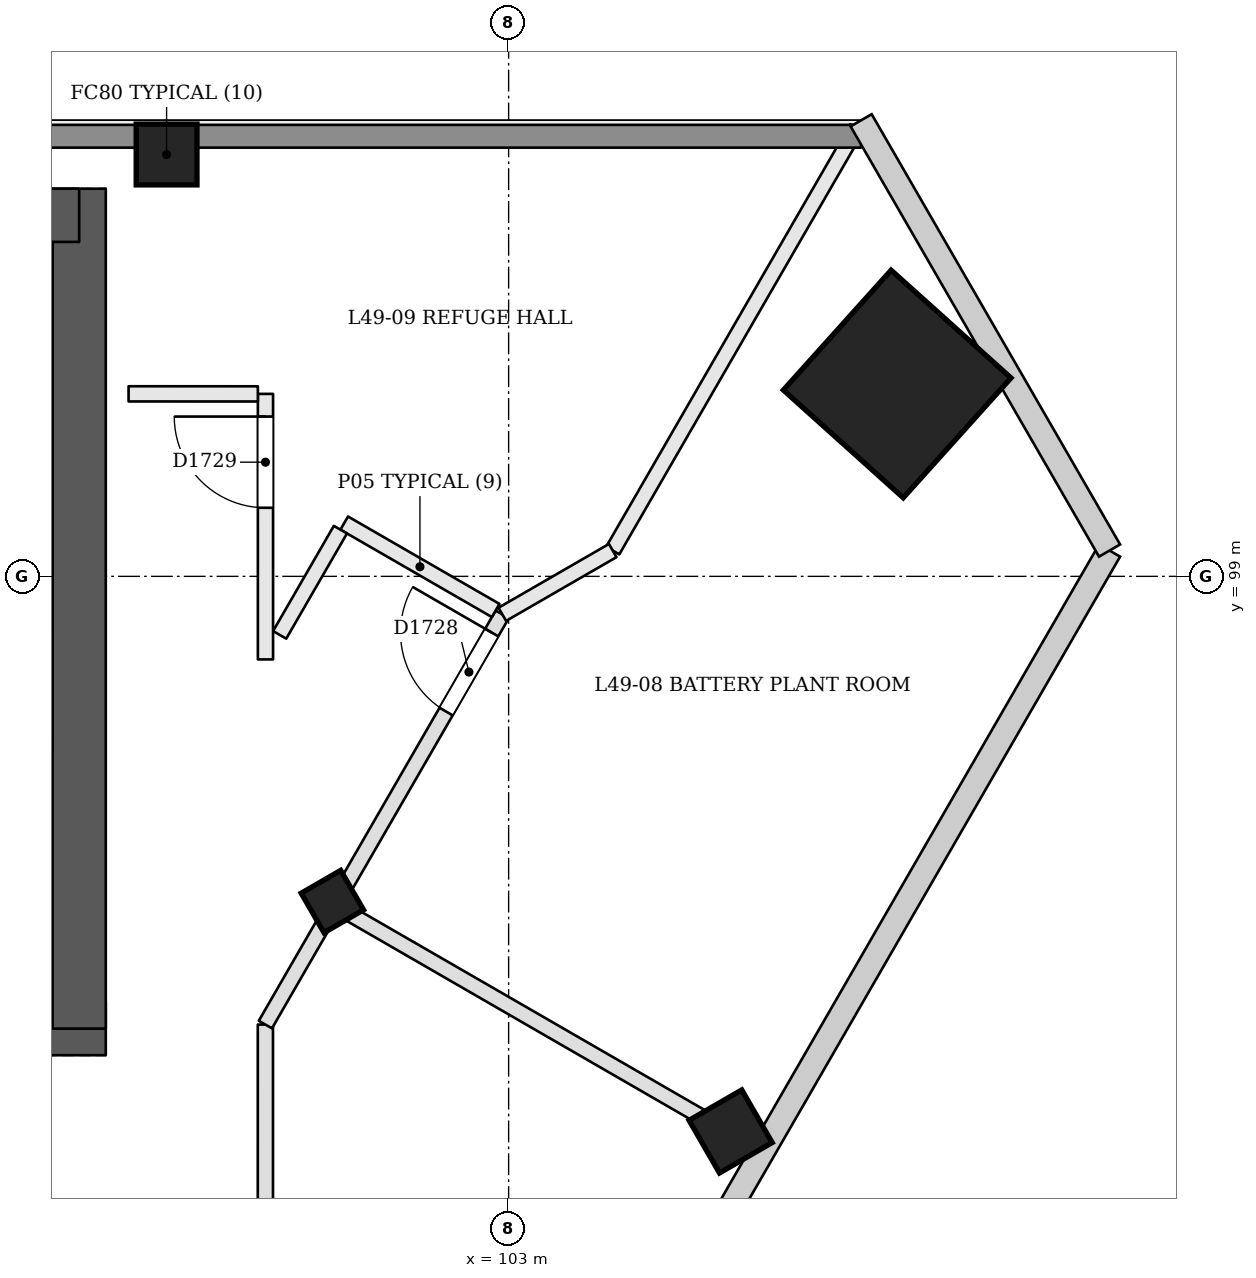
"""IFC4 building model, lengths in metres.
Left out: names, types, materials, properties, quantities, classifications, styles, units other than length and angle.
Written with IfcOpenShell. Run it as: python <this file> out.ifc"""

import sys

from ifc_helpers import new_model, si_unit, direction, frame, frame_2d, origin, origin_2d, place, context, subcontext, project, spatial, rectangle, extrude, element, fill, save


model = new_model("IFC4")
c1 = context("Model", 3, precision=1e-05, world=origin(), true_north=direction((0.0, 1.0)))
c2 = subcontext(c1, "Body", "Model", "MODEL_VIEW")
j1 = project(units=[si_unit("LENGTHUNIT", "METRE"), si_unit("PLANEANGLEUNIT", "RADIAN")], contexts=[c1])
p1 = place(None, origin())
s1 = spatial("IfcSite", under=j1, at=p1, CompositionType="ELEMENT")
p2 = place(p1, origin())
s2 = spatial("IfcBuilding", under=s1, at=p2, CompositionType="ELEMENT")
p3 = place(p2, frame((0.0, 0.0, 189.0)))
s3 = spatial("IfcBuildingStorey", under=s2, at=p3, CompositionType="ELEMENT", Elevation=189.0)
p4 = place(p3, frame((72.65, 93.05, 0.0), z_axis=(0.0, 0.0, 1.0), x_axis=(1.0, 0.0, 0.0)))
e1 = element("IfcWall", 1, at=p4, inside=s3, PredefinedType="SHEAR", context=c2, shape_type="SweptSolid", body=[
    extrude(rectangle(XDim=25.05, YDim=0.7, at=frame_2d((12.525, 0.0))), origin(), (0.0, 0.0, 1.0), 5.4),
])
p5 = place(p4, frame((1.15, 0.0, 0.0)))
e2 = element("IfcOpeningElement", 2, at=p5, cuts=e1, PredefinedType="OPENING", context=c2, shape_type="SweptSolid", body=[
    extrude(rectangle(XDim=1.2, YDim=2.1, at=frame_2d((0.6, 1.05))), frame((0.0, 0.36, 0.0), z_axis=(0.0, -1.0, 0.0), x_axis=(1.0, 0.0, 0.0)), (0.0, 0.0, 1.0), 0.721),
])
p6 = place(p4, frame((3.35, 0.0, 0.0)))
e3 = element("IfcOpeningElement", 3, at=p6, cuts=e1, PredefinedType="OPENING", context=c2, shape_type="SweptSolid", body=[
    extrude(rectangle(XDim=1.2, YDim=2.1, at=frame_2d((0.6, 1.05))), frame((0.0, 0.36, 0.0), z_axis=(0.0, -1.0, 0.0), x_axis=(1.0, 0.0, 0.0)), (0.0, 0.0, 1.0), 0.721),
])
p7 = place(p4, frame((13.35, 0.0, 0.0)))
e4 = element("IfcOpeningElement", 4, at=p7, cuts=e1, PredefinedType="OPENING", context=c2, shape_type="SweptSolid", body=[
    extrude(rectangle(XDim=1.2, YDim=2.1, at=frame_2d((0.6, 1.05))), frame((0.0, 0.36, 0.0), z_axis=(0.0, -1.0, 0.0), x_axis=(1.0, 0.0, 0.0)), (0.0, 0.0, 1.0), 0.721),
])
p8 = place(p4, frame((21.65, 0.0, 0.0)))
e5 = element("IfcOpeningElement", 5, at=p8, cuts=e1, PredefinedType="OPENING", context=c2, shape_type="SweptSolid", body=[
    extrude(rectangle(XDim=1.2, YDim=2.1, at=frame_2d((0.6, 1.05))), frame((0.0, 0.36, 0.0), z_axis=(0.0, -1.0, 0.0), x_axis=(1.0, 0.0, 0.0)), (0.0, 0.0, 1.0), 0.721),
])
p9 = place(p3, frame((97.35, 93.05, 0.0), z_axis=(0.0, 0.0, 1.0), x_axis=(0.0, 1.0, 0.0)))
e6 = element("IfcWall", 6, at=p9, inside=s3, PredefinedType="SHEAR", context=c2, shape_type="SweptSolid", body=[
    extrude(rectangle(XDim=11.05, YDim=0.7, at=frame_2d((5.525, 0.0))), origin(), (0.0, 0.0, 1.0), 5.4),
])
p10 = place(p3, frame((97.35, 103.75, 0.0), z_axis=(0.0, 0.0, 1.0), x_axis=(-1.0, 0.0, 0.0)))
e7 = element("IfcWall", 7, at=p10, inside=s3, PredefinedType="SHEAR", context=c2, shape_type="SweptSolid", body=[
    extrude(rectangle(XDim=25.05, YDim=0.7, at=frame_2d((12.525, 0.0))), origin(), (0.0, 0.0, 1.0), 5.4),
])
p11 = place(p3, frame((100.708, 94.675, -0.018), z_axis=(-0.022221387519, 0.03843577394, 0.999013964476), x_axis=(-0.499733733171, -0.86589458088, 0.022198439876)))
e8 = element("IfcColumn", 8, at=p11, inside=s3, PredefinedType="COLUMN", context=c2, shape_type="SweptSolid", body=[
    extrude(rectangle(XDim=0.6, YDim=0.6, at=origin_2d()), origin(), (0.0, 0.0, 1.0), 5.406),
])
p12 = place(p3, frame((108.146, 101.52, 0.0), z_axis=(-0.028425675249, 0.009219137918, 0.999553394513), x_axis=(0.500959106695, -0.865185509225, 0.022226291798)))
e9 = element("IfcColumn", 9, at=p12, inside=s3, PredefinedType="COLUMN", context=c2, shape_type="SweptSolid", body=[
    extrude(rectangle(XDim=2.12, YDim=2.12, at=origin_2d()), origin(), (0.0, 0.0, 1.0), 5.402),
])
p13 = place(p3, frame((98.5, 104.55, 0.0), z_axis=(0.0, 0.0, 1.0), x_axis=(1.0, 0.0, 0.0)))
e10 = element("IfcColumn", 10, at=p13, inside=s3, PredefinedType="COLUMN", context=c2, shape_type="SweptSolid", body=[
    extrude(rectangle(XDim=0.8, YDim=0.8, at=origin_2d()), origin(), (0.0, 0.0, 1.0), 5.4),
])
p14 = place(p3, frame((105.947, 91.651, 0.0), z_axis=(-0.02217724499, 0.038437546816, 0.999014877166), x_axis=(-0.500496317102, -0.865454286347, 0.022188168278)))
e11 = element("IfcColumn", 11, at=p14, inside=s3, PredefinedType="COLUMN", context=c2, shape_type="SweptSolid", body=[
    extrude(rectangle(XDim=0.8, YDim=0.8, at=origin_2d()), origin(), (0.0, 0.0, 1.0), 5.405),
])
p15 = place(p3, frame((99.8, 90.2, 0.0), z_axis=(0.0, 0.0, 1.0), x_axis=(8.4097216e-05, 0.999999996464, 0.0)))
e12 = element("IfcWall", 12, at=p15, inside=s3, PredefinedType="PARTITIONING", context=c2, shape_type="SweptSolid", body=[
    extrude(rectangle(XDim=2.903, YDim=0.2, at=frame_2d((1.452, 0.0))), origin(), (0.0, 0.0, 1.0), 4.95),
])
p16 = place(p3, frame((99.8, 93.104, 0.0), z_axis=(0.0, 0.0, 1.0), x_axis=(0.500007335828, 0.866021168401, 0.0)))
e13 = element("IfcWall", 13, at=p16, inside=s3, PredefinedType="PARTITIONING", context=c2, shape_type="SweptSolid", body=[
    extrude(rectangle(XDim=6.231, YDim=0.2, at=frame_2d((3.116, 0.0))), origin(), (0.0, 0.0, 1.0), 4.95),
])
p17 = place(p16, frame((4.755, 0.0, 0.0)))
e14 = element("IfcOpeningElement", 14, at=p17, cuts=e13, PredefinedType="OPENING", context=c2, shape_type="SweptSolid", body=[
    extrude(rectangle(XDim=1.2, YDim=2.4, at=frame_2d((0.6, 1.2))), frame((0.0, 0.11, 0.0), z_axis=(0.0, -1.0, 0.0), x_axis=(1.0, 0.0, 0.0)), (0.0, 0.0, 1.0), 0.221),
])
p18 = place(p3, frame((102.83, 98.551, 0.0), z_axis=(0.0, 0.0, 1.0), x_axis=(-0.866060120656, 0.499939863793, 0.0)))
e15 = element("IfcWall", 15, at=p18, inside=s3, PredefinedType="PARTITIONING", context=c2, shape_type="SweptSolid", body=[
    extrude(rectangle(XDim=2.301, YDim=0.2, at=frame_2d((1.15, 0.0))), origin(), (0.0, 0.0, 1.0), 4.95),
])
p19 = place(p3, frame((100.787, 99.615, 0.0), z_axis=(0.0, 0.0, 1.0), x_axis=(-0.500163094741, -0.865931220513, 0.0)))
e16 = element("IfcWall", 16, at=p19, inside=s3, PredefinedType="PARTITIONING", context=c2, shape_type="SweptSolid", body=[
    extrude(rectangle(XDim=1.599, YDim=0.2, at=frame_2d((0.799, 0.0))), origin(), (0.0, 0.0, 1.0), 4.95),
])
p20 = place(p3, frame((99.801, 97.907, 0.0), z_axis=(0.0, 0.0, 1.0), x_axis=(-6.989097e-05, 0.999999997558, 0.0)))
e17 = element("IfcWall", 17, at=p20, inside=s3, PredefinedType="PARTITIONING", context=c2, shape_type="SweptSolid", body=[
    extrude(rectangle(XDim=3.493, YDim=0.2, at=frame_2d((1.747, 0.0))), origin(), (0.0, 0.0, 1.0), 4.95),
])
p21 = place(p20, frame((1.995, 0.0, 0.0)))
e18 = element("IfcOpeningElement", 18, at=p21, cuts=e17, PredefinedType="OPENING", context=c2, shape_type="SweptSolid", body=[
    extrude(rectangle(XDim=1.2, YDim=2.4, at=frame_2d((0.6, 1.2))), frame((0.0, 0.11, 0.0), z_axis=(0.0, -1.0, 0.0), x_axis=(1.0, 0.0, 0.0)), (0.0, 0.0, 1.0), 0.221),
])
p22 = place(p3, frame((99.701, 101.4, 0.0), z_axis=(0.0, 0.0, 1.0), x_axis=(-0.999999958796, 0.000287067593, 0.0)))
e19 = element("IfcWall", 19, at=p22, inside=s3, PredefinedType="PARTITIONING", context=c2, shape_type="SweptSolid", body=[
    extrude(rectangle(XDim=1.701, YDim=0.2, at=frame_2d((0.851, 0.0))), origin(), (0.0, 0.0, 1.0), 4.95),
])
p23 = place(p3, frame((106.25, 91.476, 0.0), z_axis=(0.0, 0.0, 1.0), x_axis=(-0.866019091382, 0.500010933242, 0.0)))
e20 = element("IfcWall", 20, at=p23, inside=s3, PredefinedType="PARTITIONING", context=c2, shape_type="SweptSolid", body=[
    extrude(rectangle(XDim=6.3, YDim=0.2, at=frame_2d((3.15, 0.0))), origin(), (0.0, 0.0, 1.0), 4.95),
])
p24 = place(p3, frame((107.58, 104.9, 0.0), z_axis=(0.0, 0.0, 1.0), x_axis=(-0.500007707388, -0.866020953876, 0.0)))
e21 = element("IfcWall", 21, at=p24, inside=s3, PredefinedType="PARTITIONING", context=c2, shape_type="SweptSolid", body=[
    extrude(rectangle(XDim=6.421, YDim=0.2, at=frame_2d((3.21, 0.0))), origin(), (0.0, 0.0, 1.0), 4.95),
])
p25 = place(p3, frame((104.369, 99.339, 0.0), z_axis=(0.0, 0.0, 1.0), x_axis=(-0.865977131537, -0.500083600666, 0.0)))
e22 = element("IfcWall", 22, at=p25, inside=s3, PredefinedType="PARTITIONING", context=c2, shape_type="SweptSolid", body=[
    extrude(rectangle(XDim=1.677, YDim=0.2, at=frame_2d((0.839, 0.0))), origin(), (0.0, 0.0, 1.0), 4.95),
])
p26 = place(p3, frame((62.362, 104.79, 0.0), z_axis=(0.0, 0.0, 1.0), x_axis=(1.0, 0.0, 0.0)))
e23 = element("IfcWall", 23, at=p26, inside=s3, PredefinedType="SOLIDWALL", context=c2, shape_type="SweptSolid", body=[
    extrude(rectangle(XDim=45.275, YDim=0.3, at=frame_2d((22.638, 0.0))), origin(), (0.0, 0.0, 1.0), 4.95),
])
p27 = place(p17, origin())
e24 = element("IfcDoor", 24, at=p27, inside=s3, OperationType="SINGLE_SWING_RIGHT", PredefinedType="NOTDEFINED", context=c2, shape_type="SweptSolid", body=[
    extrude(rectangle(XDim=1.2, YDim=2.4, at=frame_2d((0.6, 1.2))), frame((0.0, 0.025, 0.0), z_axis=(0.0, -1.0, 0.0), x_axis=(1.0, 0.0, 0.0)), (0.0, 0.0, 1.0), 0.05),
])
fill(e14, e24)
p28 = place(p21, origin())
e25 = element("IfcDoor", 25, at=p28, inside=s3, OperationType="SINGLE_SWING_RIGHT", PredefinedType="NOTDEFINED", context=c2, shape_type="SweptSolid", body=[
    extrude(rectangle(XDim=1.2, YDim=2.4, at=frame_2d((0.6, 1.2))), frame((0.0, 0.025, 0.0), z_axis=(0.0, -1.0, 0.0), x_axis=(1.0, 0.0, 0.0)), (0.0, 0.0, 1.0), 0.05),
])
fill(e18, e25)
save(model, sys.argv[1])
